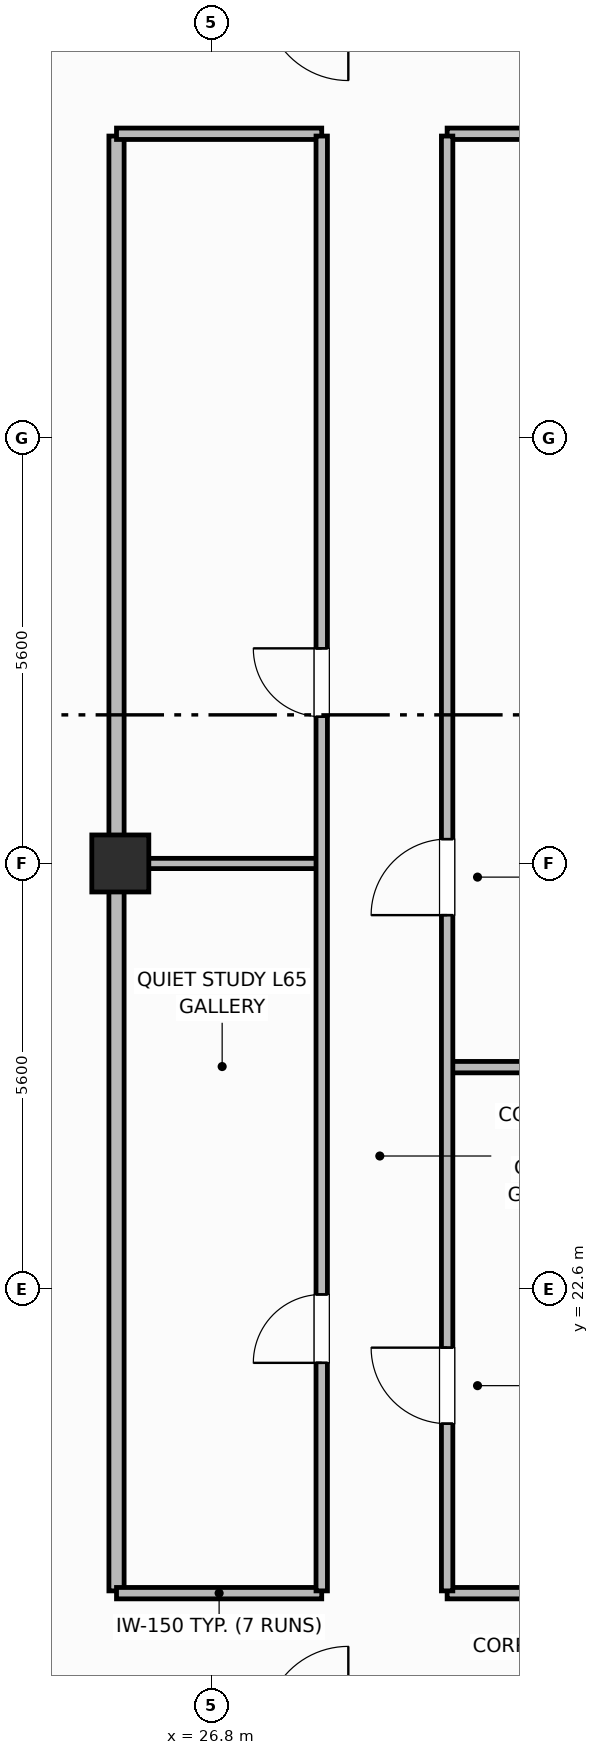
"""IFC4 building model, lengths in metres.
Left out: names, types, materials, properties, quantities, classifications, styles, units other than length and angle.
Written with IfcOpenShell. Run it as: python <this file> out.ifc"""

import sys

from ifc_helpers import new_model, si_unit, direction, frame, frame_2d, origin, origin_2d, place, context, subcontext, project, spatial, rectangle, extrude, element, fill, save


model = new_model("IFC4")
c1 = context("Model", 3, precision=1e-05, world=origin(), true_north=direction((0.0, 1.0)))
c2 = subcontext(c1, "Body", "Model", "MODEL_VIEW")
j1 = project(units=[si_unit("LENGTHUNIT", "METRE"), si_unit("PLANEANGLEUNIT", "RADIAN")], contexts=[c1])
p1 = place(None, origin())
s1 = spatial("IfcSite", under=j1, at=p1, CompositionType="ELEMENT")
p2 = place(p1, origin())
s2 = spatial("IfcBuilding", under=s1, at=p2, CompositionType="ELEMENT")
p3 = place(p2, frame((0.0, 0.0, 260.2)))
s3 = spatial("IfcBuildingStorey", under=s2, at=p3, CompositionType="ELEMENT", Elevation=260.2)
p4 = place(p3, frame((25.6, 28.2, 0.0), z_axis=(0.0, 0.0, 1.0), x_axis=(1.0, 0.0, 0.0)))
e1 = element("IfcColumn", 1, at=p4, inside=s3, PredefinedType="COLUMN", context=c2, shape_type="SweptSolid", body=[
    extrude(rectangle(XDim=0.75, YDim=0.75, at=origin_2d()), origin(), (0.0, 0.0, 1.0), 3.7),
])
p5 = place(p3, frame((25.55, 18.63, 0.0), z_axis=(0.0, 0.0, 1.0), x_axis=(0.0, 1.0, 0.0)))
e2 = element("IfcWall", 2, at=p5, inside=s3, PredefinedType="PARTITIONING", context=c2, shape_type="SweptSolid", body=[
    extrude(rectangle(XDim=19.14, YDim=0.2, at=frame_2d((9.57, 0.0))), origin(), (0.0, 0.0, 1.0), 2.56),
])
p6 = place(p3, frame((25.55, 18.6, 0.0), z_axis=(0.0, 0.0, 1.0), x_axis=(1.0, 0.0, 0.0)))
e3 = element("IfcWall", 3, at=p6, inside=s3, PredefinedType="PARTITIONING", context=c2, shape_type="SweptSolid", body=[
    extrude(rectangle(XDim=2.7, YDim=0.15, at=frame_2d((1.35, 0.0))), origin(), (0.0, 0.0, 1.0), 2.56),
])
p7 = place(p3, frame((29.9, 18.6, 0.0), z_axis=(0.0, 0.0, 1.0), x_axis=(1.0, 0.0, 0.0)))
e4 = element("IfcWall", 4, at=p7, inside=s3, PredefinedType="PARTITIONING", context=c2, shape_type="SweptSolid", body=[
    extrude(rectangle(XDim=22.95, YDim=0.15, at=frame_2d((11.475, 0.0))), origin(), (0.0, 0.0, 1.0), 2.56),
])
p8 = place(p3, frame((25.55, 37.8, 0.0), z_axis=(0.0, 0.0, 1.0), x_axis=(1.0, 0.0, 0.0)))
e5 = element("IfcWall", 5, at=p8, inside=s3, PredefinedType="PARTITIONING", context=c2, shape_type="SweptSolid", body=[
    extrude(rectangle(XDim=2.7, YDim=0.15, at=frame_2d((1.35, 0.0))), origin(), (0.0, 0.0, 1.0), 2.56),
])
p9 = place(p3, frame((29.9, 37.8, 0.0), z_axis=(0.0, 0.0, 1.0), x_axis=(1.0, 0.0, 0.0)))
e6 = element("IfcWall", 6, at=p9, inside=s3, PredefinedType="PARTITIONING", context=c2, shape_type="SweptSolid", body=[
    extrude(rectangle(XDim=22.95, YDim=0.15, at=frame_2d((11.475, 0.0))), origin(), (0.0, 0.0, 1.0), 2.56),
])
p10 = place(p3, frame((25.6, 28.2, 0.0), z_axis=(0.0, 0.0, 1.0), x_axis=(1.0, 0.0, 0.0)))
e7 = element("IfcWall", 7, at=p10, inside=s3, PredefinedType="PARTITIONING", context=c2, shape_type="SweptSolid", body=[
    extrude(rectangle(XDim=2.66, YDim=0.135, at=frame_2d((1.33, 0.0))), origin(), (0.0, 0.0, 1.0), 2.56),
])
p11 = place(p3, frame((29.93, 25.521, 0.0), z_axis=(0.0, 0.0, 1.0), x_axis=(1.0, 0.0, 0.0)))
e8 = element("IfcWall", 8, at=p11, inside=s3, PredefinedType="PARTITIONING", context=c2, shape_type="SweptSolid", body=[
    extrude(rectangle(XDim=22.87, YDim=0.15, at=frame_2d((11.435, 0.0))), origin(), (0.0, 0.0, 1.0), 2.56),
])
p12 = place(p3, frame((28.25, 18.63, 0.0), z_axis=(0.0, 0.0, 1.0), x_axis=(0.0, 1.0, 0.0)))
e9 = element("IfcWall", 9, at=p12, inside=s3, PredefinedType="PARTITIONING", context=c2, shape_type="SweptSolid", body=[
    extrude(rectangle(XDim=19.14, YDim=0.15, at=frame_2d((9.57, 0.0))), origin(), (0.0, 0.0, 1.0), 2.56),
])
p13 = place(p12, frame((3.0, 0.0, 0.0)))
e10 = element("IfcOpeningElement", 10, at=p13, cuts=e9, PredefinedType="OPENING", context=c2, shape_type="SweptSolid", body=[
    extrude(rectangle(XDim=0.9, YDim=2.1, at=frame_2d((0.45, 1.05))), frame((0.0, 0.085, 0.0), z_axis=(0.0, -1.0, 0.0), x_axis=(1.0, 0.0, 0.0)), (0.0, 0.0, 1.0), 0.17),
])
p14 = place(p12, frame((11.5, 0.0, 0.0)))
e11 = element("IfcOpeningElement", 11, at=p14, cuts=e9, PredefinedType="OPENING", context=c2, shape_type="SweptSolid", body=[
    extrude(rectangle(XDim=0.9, YDim=2.1, at=frame_2d((0.45, 1.05))), frame((0.0, 0.085, 0.0), z_axis=(0.0, -1.0, 0.0), x_axis=(1.0, 0.0, 0.0)), (0.0, 0.0, 1.0), 0.17),
])
p15 = place(p3, frame((29.9, 18.63, 0.0), z_axis=(0.0, 0.0, 1.0), x_axis=(0.0, 1.0, 0.0)))
e12 = element("IfcWall", 12, at=p15, inside=s3, PredefinedType="PARTITIONING", context=c2, shape_type="SweptSolid", body=[
    extrude(rectangle(XDim=19.14, YDim=0.15, at=frame_2d((9.57, 0.0))), origin(), (0.0, 0.0, 1.0), 2.56),
])
p16 = place(p15, frame((2.2, 0.0, 0.0)))
e13 = element("IfcOpeningElement", 13, at=p16, cuts=e12, PredefinedType="OPENING", context=c2, shape_type="SweptSolid", body=[
    extrude(rectangle(XDim=1.0, YDim=2.15, at=frame_2d((0.5, 1.075))), frame((0.0, 0.085, 0.0), z_axis=(0.0, -1.0, 0.0), x_axis=(1.0, 0.0, 0.0)), (0.0, 0.0, 1.0), 0.17),
])
p17 = place(p15, frame((8.89, 0.0, 0.0)))
e14 = element("IfcOpeningElement", 14, at=p17, cuts=e12, PredefinedType="OPENING", context=c2, shape_type="SweptSolid", body=[
    extrude(rectangle(XDim=1.0, YDim=2.15, at=frame_2d((0.5, 1.075))), frame((0.0, 0.085, 0.0), z_axis=(0.0, -1.0, 0.0), x_axis=(1.0, 0.0, 0.0)), (0.0, 0.0, 1.0), 0.17),
])
p18 = place(p13, origin())
e15 = element("IfcDoor", 15, at=p18, inside=s3, OperationType="SINGLE_SWING_LEFT", PredefinedType="DOOR", context=c2, shape_type="SweptSolid", body=[
    extrude(rectangle(XDim=0.9, YDim=2.1, at=frame_2d((0.45, 1.05))), frame((0.0, 0.025, 0.0), z_axis=(0.0, -1.0, 0.0), x_axis=(1.0, 0.0, 0.0)), (0.0, 0.0, 1.0), 0.05),
])
fill(e10, e15)
p19 = place(p14, origin())
e16 = element("IfcDoor", 16, at=p19, inside=s3, OperationType="SINGLE_SWING_RIGHT", PredefinedType="DOOR", context=c2, shape_type="SweptSolid", body=[
    extrude(rectangle(XDim=0.9, YDim=2.1, at=frame_2d((0.45, 1.05))), frame((0.0, 0.025, 0.0), z_axis=(0.0, -1.0, 0.0), x_axis=(1.0, 0.0, 0.0)), (0.0, 0.0, 1.0), 0.05),
])
fill(e11, e16)
p20 = place(p16, origin())
e17 = element("IfcDoor", 17, at=p20, inside=s3, OperationType="SINGLE_SWING_RIGHT", PredefinedType="DOOR", context=c2, shape_type="SweptSolid", body=[
    extrude(rectangle(XDim=1.0, YDim=2.15, at=frame_2d((0.5, 1.075))), frame((0.0, 0.025, 0.0), z_axis=(0.0, -1.0, 0.0), x_axis=(1.0, 0.0, 0.0)), (0.0, 0.0, 1.0), 0.05),
])
fill(e13, e17)
p21 = place(p17, origin())
e18 = element("IfcDoor", 18, at=p21, inside=s3, OperationType="SINGLE_SWING_LEFT", PredefinedType="DOOR", context=c2, shape_type="SweptSolid", body=[
    extrude(rectangle(XDim=1.0, YDim=2.15, at=frame_2d((0.5, 1.075))), frame((0.0, 0.025, 0.0), z_axis=(0.0, -1.0, 0.0), x_axis=(1.0, 0.0, 0.0)), (0.0, 0.0, 1.0), 0.05),
])
fill(e14, e18)
save(model, sys.argv[1])
